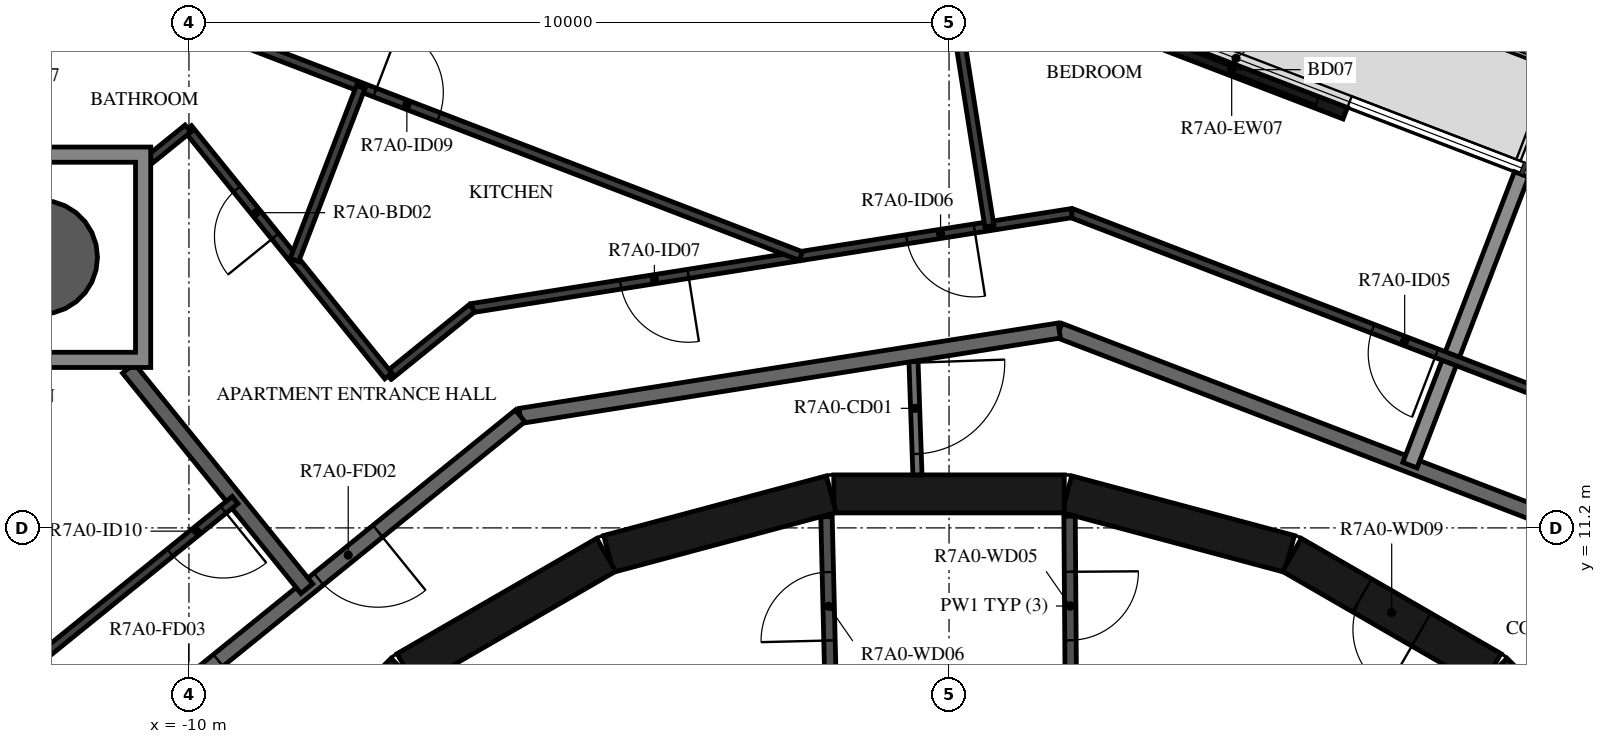
"""IFC4 building model, lengths in metres.
Left out: names, types, materials, properties, quantities, classifications, styles, units other than length and angle.
Written with IfcOpenShell. Run it as: python <this file> out.ifc"""

import sys

from ifc_helpers import new_model, si_unit, direction, frame, frame_2d, origin, origin_2d, place, context, subcontext, project, spatial, polyline, rectangle, hollow_circle, outline, extrude, element, fill, save


model = new_model("IFC4")
c1 = context("Model", 3, precision=1e-05, world=origin(), true_north=direction((0.0, 1.0)))
c2 = subcontext(c1, "Body", "Model", "MODEL_VIEW")
j1 = project(units=[si_unit("LENGTHUNIT", "METRE"), si_unit("PLANEANGLEUNIT", "RADIAN")], contexts=[c1])
p1 = place(None, origin())
s1 = spatial("IfcSite", under=j1, at=p1, CompositionType="ELEMENT")
p2 = place(p1, origin())
s2 = spatial("IfcBuilding", under=s1, at=p2, CompositionType="ELEMENT")
p3 = place(p2, frame((0.0, 0.0, 270.4)))
s3 = spatial("IfcBuildingStorey", under=s2, at=p3, CompositionType="ELEMENT", Elevation=270.4)
p4 = place(p3, frame((-11.953, 14.76, -0.38), z_axis=(0.0, 0.0, 1.0), x_axis=(1.0, 0.0, 0.0)))
e1 = element("IfcColumn", 1, at=p4, inside=s3, PredefinedType="COLUMN", context=c2, shape_type="SweptSolid", body=[
    extrude(hollow_circle(Radius=0.75, WallThickness=0.035, at=origin_2d()), origin(), (0.0, 0.0, 1.0), 3.5),
])
p5 = place(p3, frame((5.212, 16.655, 0.0), z_axis=(0.0, 0.0, 1.0), x_axis=(-0.933579413923, 0.358370587381, 0.0)))
e2 = element("IfcWall", 2, at=p5, inside=s3, PredefinedType="STANDARD", context=c2, shape_type="SweptSolid", body=[
    extrude(rectangle(XDim=3.2, YDim=0.16, at=frame_2d((1.6, 0.0))), origin(), (0.0, 0.0, 1.0), 3.12),
])
p6 = place(p5, frame((0.4, 0.0, 0.0)))
e3 = element("IfcOpeningElement", 3, at=p6, cuts=e2, PredefinedType="OPENING", context=c2, shape_type="SweptSolid", body=[
    extrude(rectangle(XDim=2.4, YDim=2.4, at=frame_2d((1.2, 1.2))), frame((0.0, 0.09, 0.0), z_axis=(0.0, -1.0, 0.0), x_axis=(1.0, 0.0, 0.0)), (0.0, 0.0, 1.0), 0.18),
])
p7 = place(p3, frame((9.308, 7.164, 0.0), z_axis=(0.0, 0.0, 1.0), x_axis=(-0.707106781187, 0.707106781187, 0.0)))
e4 = element("IfcWall", 4, at=p7, inside=s3, PredefinedType="SHEAR", context=c2, shape_type="SweptSolid", body=[
    extrude(rectangle(XDim=3.032, YDim=0.5, at=frame_2d((1.516, 0.0))), origin(), (0.0, 0.0, 1.0), 3.12),
])
p8 = place(p7, frame((0.416, 0.0, 0.0)))
e5 = element("IfcOpeningElement", 5, at=p8, cuts=e4, PredefinedType="OPENING", context=c2, shape_type="SweptSolid", body=[
    extrude(rectangle(XDim=1.2, YDim=2.1, at=frame_2d((0.6, 1.05))), frame((0.0, 0.26, 0.0), z_axis=(0.0, -1.0, 0.0), x_axis=(1.0, 0.0, 0.0)), (0.0, 0.0, 1.0), 0.52),
])
p9 = place(p3, frame((7.137, 9.329, 0.0), z_axis=(0.0, 0.0, 1.0), x_axis=(-0.865975092491, 0.500087131594, 0.0)))
e6 = element("IfcWall", 6, at=p9, inside=s3, PredefinedType="SHEAR", context=c2, shape_type="SweptSolid", body=[
    extrude(rectangle(XDim=3.033, YDim=0.5, at=frame_2d((1.516, 0.0))), origin(), (0.0, 0.0, 1.0), 3.12),
])
p10 = place(p9, frame((1.066, 0.0, 0.0)))
e7 = element("IfcOpeningElement", 7, at=p10, cuts=e6, PredefinedType="OPENING", context=c2, shape_type="SweptSolid", body=[
    extrude(rectangle(XDim=0.9, YDim=2.1, at=frame_2d((0.45, 1.05))), frame((0.0, 0.26, 0.0), z_axis=(0.0, -1.0, 0.0), x_axis=(1.0, 0.0, 0.0)), (0.0, 0.0, 1.0), 0.52),
])
for number, where, z_axis, x_axis in (
    (8, (4.479, 10.858, 0.0), (0.0, 0.0, 1.0), (-0.966, 0.259, 0.0)),
    (9, (1.516, 11.647, 0.0), (0.0, 0.0, 1.0), (-1.0, 0.0, 0.0)),
    (10, (-1.55, 11.643, 0.0), (0.0, 0.0, 1.0), (-0.966, -0.259, 0.0)),
    (11, (-4.51, 10.845, 0.0), (0.0, 0.0, 1.0), (-0.866, -0.5, 0.0)),
):
    element("IfcWall", number, at=place(p3, frame(where, z_axis=z_axis, x_axis=x_axis)), inside=s3, PredefinedType="SHEAR", context=c2, shape_type="SweptSolid", body=[
        extrude(rectangle(XDim=3.033, YDim=0.5, at=frame_2d((1.516, 0.0))), origin(), (0.0, 0.0, 1.0), 3.12),
    ])
p11 = place(p3, frame((-7.164, 9.308, 0.0), z_axis=(0.0, 0.0, 1.0), x_axis=(-0.707106781187, -0.707106781187, 0.0)))
e12 = element("IfcWall", 12, at=p11, inside=s3, PredefinedType="SHEAR", context=c2, shape_type="SweptSolid", body=[
    extrude(rectangle(XDim=3.032, YDim=0.5, at=frame_2d((1.516, 0.0))), origin(), (0.0, 0.0, 1.0), 3.12),
])
p12 = place(p11, frame((1.416, 0.0, 0.0)))
e13 = element("IfcOpeningElement", 13, at=p12, cuts=e12, PredefinedType="OPENING", context=c2, shape_type="SweptSolid", body=[
    extrude(rectangle(XDim=1.2, YDim=2.1, at=frame_2d((0.6, 1.05))), frame((0.0, 0.26, 0.0), z_axis=(0.0, -1.0, 0.0), x_axis=(1.0, 0.0, 0.0)), (0.0, 0.0, 1.0), 0.52),
])
p13 = place(p3, frame((1.586, 11.354, 0.0), z_axis=(0.0, 0.0, 1.0), x_axis=(0.007227482881, -0.999973881405, 0.0)))
e14 = element("IfcWall", 14, at=p13, inside=s3, PredefinedType="PARTITIONING", context=c2, shape_type="SweptSolid", body=[
    extrude(rectangle(XDim=2.365, YDim=0.15, at=frame_2d((1.182, 0.0))), origin(), (0.0, 0.0, 1.0), 3.12),
])
p14 = place(p13, frame((0.732, 0.0, 0.0)))
e15 = element("IfcOpeningElement", 15, at=p14, cuts=e14, PredefinedType="OPENING", context=c2, shape_type="SweptSolid", body=[
    extrude(rectangle(XDim=0.9, YDim=2.1, at=frame_2d((0.45, 1.05))), frame((0.0, 0.085, 0.0), z_axis=(0.0, -1.0, 0.0), x_axis=(1.0, 0.0, 0.0)), (0.0, 0.0, 1.0), 0.17),
])
p15 = place(p3, frame((-1.555, 8.99, 0.0), z_axis=(0.0, 0.0, 1.0), x_axis=(-0.024125549686, 0.999708936567, 0.0)))
e16 = element("IfcWall", 16, at=p15, inside=s3, PredefinedType="PARTITIONING", context=c2, shape_type="SweptSolid", body=[
    extrude(rectangle(XDim=2.358, YDim=0.15, at=frame_2d((1.179, 0.0))), origin(), (0.0, 0.0, 1.0), 3.12),
])
p16 = place(p15, frame((0.729, 0.0, 0.0)))
e17 = element("IfcOpeningElement", 17, at=p16, cuts=e16, PredefinedType="OPENING", context=c2, shape_type="SweptSolid", body=[
    extrude(rectangle(XDim=0.9, YDim=2.1, at=frame_2d((0.45, 1.05))), frame((0.0, 0.085, 0.0), z_axis=(0.0, -1.0, 0.0), x_axis=(1.0, 0.0, 0.0)), (0.0, 0.0, 1.0), 0.17),
])
p17 = place(p3, frame((-0.471, 13.492, 0.0), z_axis=(0.0, 0.0, 1.0), x_axis=(0.034873173869, -0.999391745886, 0.0)))
e18 = element("IfcWall", 18, at=p17, inside=s3, PredefinedType="PARTITIONING", context=c2, shape_type="SweptSolid", body=[
    extrude(rectangle(XDim=1.596, YDim=0.12, at=frame_2d((0.798, 0.0))), origin(), (0.0, 0.0, 1.0), 3.12),
])
p18 = place(p17, frame((0.12, 0.0, 0.0)))
e19 = element("IfcOpeningElement", 19, at=p18, cuts=e18, PredefinedType="OPENING", context=c2, shape_type="SweptSolid", body=[
    extrude(rectangle(XDim=1.2, YDim=2.1, at=frame_2d((0.6, 1.05))), frame((0.0, 0.07, 0.0), z_axis=(0.0, -1.0, 0.0), x_axis=(1.0, 0.0, 0.0)), (0.0, 0.0, 1.0), 0.14),
])
p19 = place(p3, frame((8.154, 11.223, 0.0), z_axis=(0.0, 0.0, 1.0), x_axis=(-0.93359073609, 0.358341090983, 0.0)))
e20 = element("IfcWall", 20, at=p19, inside=s3, PredefinedType="STANDARD", context=c2, shape_type="SweptSolid", body=[
    extrude(rectangle(XDim=7.181, YDim=0.2, at=frame_2d((3.59, 0.0))), origin(), (0.0, 0.0, 1.0), 3.12),
])
p20 = place(p3, frame((1.45, 13.797, 0.0), z_axis=(0.0, 0.0, 1.0), x_axis=(-0.987690361611, -0.156421704315, 0.0)))
e21 = element("IfcWall", 21, at=p20, inside=s3, PredefinedType="STANDARD", context=c2, shape_type="SweptSolid", body=[
    extrude(rectangle(XDim=7.181, YDim=0.2, at=frame_2d((3.591, 0.0))), origin(), (0.0, 0.0, 1.0), 3.12),
])
p21 = place(p3, frame((-5.643, 12.673, 0.0), z_axis=(0.0, 0.0, 1.0), x_axis=(-0.777160148113, -0.629302871585, 0.0)))
e22 = element("IfcWall", 22, at=p21, inside=s3, PredefinedType="STANDARD", context=c2, shape_type="SweptSolid", body=[
    extrude(rectangle(XDim=7.181, YDim=0.2, at=frame_2d((3.59, 0.0))), origin(), (0.0, 0.0, 1.0), 3.12),
])
p22 = place(p21, frame((2.41, 0.0, 0.0)))
e23 = element("IfcOpeningElement", 23, at=p22, cuts=e22, PredefinedType="OPENING", context=c2, shape_type="SweptSolid", body=[
    extrude(rectangle(XDim=1.0, YDim=2.1, at=frame_2d((0.5, 1.05))), frame((0.0, 0.11, 0.0), z_axis=(0.0, -1.0, 0.0), x_axis=(1.0, 0.0, 0.0)), (0.0, 0.0, 1.0), 0.22),
])
p23 = place(p21, frame((5.112, 0.0, 0.0)))
e24 = element("IfcOpeningElement", 24, at=p23, cuts=e22, PredefinedType="OPENING", context=c2, shape_type="SweptSolid", body=[
    extrude(rectangle(XDim=1.0, YDim=2.1, at=frame_2d((0.5, 1.05))), frame((0.0, 0.11, 0.0), z_axis=(0.0, -1.0, 0.0), x_axis=(1.0, 0.0, 0.0)), (0.0, 0.0, 1.0), 0.22),
])
p24 = place(p3, frame((7.532, 15.85, 0.0), z_axis=(0.0, 0.0, 1.0), x_axis=(-0.358355996975, -0.933585014571, 0.0)))
e25 = element("IfcWall", 25, at=p24, inside=s3, PredefinedType="STANDARD", context=c2, shape_type="SweptSolid", body=[
    extrude(rectangle(XDim=4.096, YDim=0.2, at=frame_2d((2.048, 0.0))), origin(), (0.0, 0.0, 1.0), 2.73),
])
p25 = place(p3, frame((-10.796, 13.299, 0.0), z_axis=(0.0, 0.0, 1.0), x_axis=(0.629290499381, -0.777170166301, 0.0)))
e26 = element("IfcWall", 26, at=p25, inside=s3, PredefinedType="STANDARD", context=c2, shape_type="SweptSolid", body=[
    extrude(rectangle(XDim=3.729, YDim=0.2, at=frame_2d((1.865, 0.0))), origin(), (0.0, 0.0, 1.0), 3.12),
])
p26 = place(p3, frame((9.067, 12.479, 0.0), z_axis=(0.0, 0.0, 1.0), x_axis=(-0.933579449035, 0.358370495911, 0.0)))
e27 = element("IfcWall", 27, at=p26, inside=s3, PredefinedType="PARTITIONING", context=c2, shape_type="SweptSolid", body=[
    extrude(rectangle(XDim=7.985, YDim=0.12, at=frame_2d((3.992, 0.0))), origin(), (0.0, 0.0, 1.0), 3.12),
])
p27 = place(p26, frame((2.841, 0.0, 0.0)))
e28 = element("IfcOpeningElement", 28, at=p27, cuts=e27, PredefinedType="OPENING", context=c2, shape_type="SweptSolid", body=[
    extrude(rectangle(XDim=0.9, YDim=2.1, at=frame_2d((0.45, 1.05))), frame((0.0, 0.07, 0.0), z_axis=(0.0, -1.0, 0.0), x_axis=(1.0, 0.0, 0.0)), (0.0, 0.0, 1.0), 0.14),
])
p28 = place(p3, frame((1.612, 15.341, 0.0), z_axis=(0.0, 0.0, 1.0), x_axis=(-0.987689722749, -0.156425738216, 0.0)))
e29 = element("IfcWall", 29, at=p28, inside=s3, PredefinedType="PARTITIONING", context=c2, shape_type="SweptSolid", body=[
    extrude(rectangle(XDim=7.985, YDim=0.12, at=frame_2d((3.992, 0.0))), origin(), (0.0, 0.0, 1.0), 3.12),
])
p29 = place(p28, frame((1.295, 0.0, 0.0)))
e30 = element("IfcOpeningElement", 30, at=p29, cuts=e29, PredefinedType="OPENING", context=c2, shape_type="SweptSolid", body=[
    extrude(rectangle(XDim=0.9, YDim=2.1, at=frame_2d((0.45, 1.05))), frame((0.0, 0.07, 0.0), z_axis=(0.0, -1.0, 0.0), x_axis=(1.0, 0.0, 0.0)), (0.0, 0.0, 1.0), 0.14),
])
p30 = place(p28, frame((5.107, 0.0, 0.0)))
e31 = element("IfcOpeningElement", 31, at=p30, cuts=e29, PredefinedType="OPENING", context=c2, shape_type="SweptSolid", body=[
    extrude(rectangle(XDim=0.9, YDim=2.1, at=frame_2d((0.45, 1.05))), frame((0.0, 0.07, 0.0), z_axis=(0.0, -1.0, 0.0), x_axis=(1.0, 0.0, 0.0)), (0.0, 0.0, 1.0), 0.14),
])
p31 = place(p3, frame((-6.274, 14.092, 0.0), z_axis=(0.0, 0.0, 1.0), x_axis=(-0.777144673245, -0.629321981855, 0.0)))
e32 = element("IfcWall", 32, at=p31, inside=s3, PredefinedType="PARTITIONING", context=c2, shape_type="SweptSolid", body=[
    extrude(rectangle(XDim=1.419, YDim=0.12, at=frame_2d((0.709, 0.0))), origin(), (0.0, 0.0, 1.0), 3.12),
])
p32 = place(p3, frame((-7.377, 13.199, 0.0), z_axis=(0.0, 0.0, 1.0), x_axis=(-0.629382670352, 0.77709552454, 0.0)))
e33 = element("IfcWall", 33, at=p32, inside=s3, PredefinedType="PARTITIONING", context=c2, shape_type="SweptSolid", body=[
    extrude(rectangle(XDim=4.188, YDim=0.12, at=frame_2d((2.094, 0.0))), origin(), (0.0, 0.0, 1.0), 3.12),
])
p33 = place(p32, frame((2.364, 0.0, 0.0)))
e34 = element("IfcOpeningElement", 34, at=p33, cuts=e33, PredefinedType="OPENING", context=c2, shape_type="SweptSolid", body=[
    extrude(rectangle(XDim=0.8, YDim=2.1, at=frame_2d((0.4, 1.05))), frame((0.0, 0.07, 0.0), z_axis=(0.0, -1.0, 0.0), x_axis=(1.0, 0.0, 0.0)), (0.0, 0.0, 1.0), 0.14),
])
p34 = place(p3, frame((-10.013, 16.454, 0.0), z_axis=(0.0, 0.0, 1.0), x_axis=(-0.777001388062, -0.629498882406, 0.0)))
e35 = element("IfcWall", 35, at=p34, inside=s3, PredefinedType="PARTITIONING", context=c2, shape_type="SweptSolid", body=[
    extrude(rectangle(XDim=0.631, YDim=0.12, at=frame_2d((0.315, 0.0))), origin(), (0.0, 0.0, 1.0), 3.12),
])
p35 = place(p3, frame((-0.037, 18.756, 0.0), z_axis=(0.0, 0.0, 1.0), x_axis=(0.156421851095, -0.987690338365, 0.0)))
e36 = element("IfcWall", 36, at=p35, inside=s3, PredefinedType="PARTITIONING", context=c2, shape_type="SweptSolid", body=[
    extrude(rectangle(XDim=3.63, YDim=0.12, at=frame_2d((1.815, 0.0))), origin(), (0.0, 0.0, 1.0), 3.12),
])
p36 = place(p3, frame((-10.289, 17.978, 0.0), z_axis=(0.0, 0.0, 1.0), x_axis=(0.933579293595, -0.358370900844, 0.0)))
e37 = element("IfcWall", 37, at=p36, inside=s3, PredefinedType="PARTITIONING", context=c2, shape_type="SweptSolid", body=[
    extrude(rectangle(XDim=8.932, YDim=0.12, at=frame_2d((4.466, 0.0))), origin(), (0.0, 0.0, 1.0), 3.12),
])
p37 = place(p36, frame((2.93, 0.0, 0.0)))
e38 = element("IfcOpeningElement", 38, at=p37, cuts=e37, PredefinedType="OPENING", context=c2, shape_type="SweptSolid", body=[
    extrude(rectangle(XDim=0.9, YDim=2.1, at=frame_2d((0.45, 1.05))), frame((0.0, 0.07, 0.0), z_axis=(0.0, -1.0, 0.0), x_axis=(1.0, 0.0, 0.0)), (0.0, 0.0, 1.0), 0.14),
])
p38 = place(p3, frame((-7.74, 17.0, 0.0), z_axis=(0.0, 0.0, 1.0), x_axis=(-0.358394723652, -0.93357014844, 0.0)))
e39 = element("IfcWall", 39, at=p38, inside=s3, PredefinedType="PARTITIONING", context=c2, shape_type="SweptSolid", body=[
    extrude(rectangle(XDim=2.436, YDim=0.12, at=frame_2d((1.218, 0.0))), origin(), (0.0, 0.0, 1.0), 3.12),
])
p39 = place(p3, frame((-9.393, 11.566, 0.0), z_axis=(0.0, 0.0, 1.0), x_axis=(-0.777100258587, -0.629376825205, 0.0)))
e40 = element("IfcWall", 40, at=p39, inside=s3, PredefinedType="PARTITIONING", context=c2, shape_type="SweptSolid", body=[
    extrude(rectangle(XDim=3.971, YDim=0.12, at=frame_2d((1.986, 0.0))), origin(), (0.0, 0.0, 1.0), 3.12),
])
p40 = place(p39, frame((0.2, 0.0, 0.0)))
e41 = element("IfcOpeningElement", 41, at=p40, cuts=e40, PredefinedType="OPENING", context=c2, shape_type="SweptSolid", body=[
    extrude(rectangle(XDim=0.9, YDim=2.1, at=frame_2d((0.45, 1.05))), frame((0.0, 0.07, 0.0), z_axis=(0.0, -1.0, 0.0), x_axis=(1.0, 0.0, 0.0)), (0.0, 0.0, 1.0), 0.14),
])
p41 = place(p3, origin())
e42 = element("IfcWall", 42, at=p41, inside=s3, PredefinedType="STANDARD", context=c2, shape_type="SweptSolid", body=[
    extrude(outline(polyline([(-10.503, 16.21), (-10.503, 13.311), (-13.403, 13.311), (-13.403, 16.21), (-10.503, 16.21)]), holes=[polyline([(-13.203, 13.51), (-10.703, 13.51), (-10.703, 16.01), (-13.203, 16.01), (-13.203, 13.51)])]), origin(), (0.0, 0.0, 1.0), 3.12),
])
p42 = place(p6, origin())
e43 = element("IfcDoor", 43, at=p42, inside=s3, OperationType="DOUBLE_DOOR_SLIDING", PredefinedType="DOOR", context=c2, shape_type="SweptSolid", body=[
    extrude(rectangle(XDim=2.4, YDim=2.4, at=frame_2d((1.2, 1.2))), frame((0.0, 0.025, 0.0), z_axis=(0.0, -1.0, 0.0), x_axis=(1.0, 0.0, 0.0)), (0.0, 0.0, 1.0), 0.05),
])
fill(e3, e43)
p43 = place(p14, origin())
e44 = element("IfcDoor", 44, at=p43, inside=s3, OperationType="SINGLE_SWING_LEFT", PredefinedType="DOOR", context=c2, shape_type="SweptSolid", body=[
    extrude(rectangle(XDim=0.9, YDim=2.1, at=frame_2d((0.45, 1.05))), frame((0.0, 0.025, 0.0), z_axis=(0.0, -1.0, 0.0), x_axis=(1.0, 0.0, 0.0)), (0.0, 0.0, 1.0), 0.05),
])
fill(e15, e44)
p44 = place(p16, origin())
e45 = element("IfcDoor", 45, at=p44, inside=s3, OperationType="SINGLE_SWING_RIGHT", PredefinedType="DOOR", context=c2, shape_type="SweptSolid", body=[
    extrude(rectangle(XDim=0.9, YDim=2.1, at=frame_2d((0.45, 1.05))), frame((0.0, 0.025, 0.0), z_axis=(0.0, -1.0, 0.0), x_axis=(1.0, 0.0, 0.0)), (0.0, 0.0, 1.0), 0.05),
])
fill(e17, e45)
p45 = place(p10, origin())
e46 = element("IfcDoor", 46, at=p45, inside=s3, OperationType="SINGLE_SWING_LEFT", PredefinedType="DOOR", context=c2, shape_type="SweptSolid", body=[
    extrude(rectangle(XDim=0.9, YDim=2.1, at=frame_2d((0.45, 1.05))), frame((0.0, 0.025, 0.0), z_axis=(0.0, -1.0, 0.0), x_axis=(1.0, 0.0, 0.0)), (0.0, 0.0, 1.0), 0.05),
])
fill(e7, e46)
p46 = place(p22, origin())
e47 = element("IfcDoor", 47, at=p46, inside=s3, OperationType="SINGLE_SWING_RIGHT", PredefinedType="DOOR", context=c2, shape_type="SweptSolid", body=[
    extrude(rectangle(XDim=1.0, YDim=2.1, at=frame_2d((0.5, 1.05))), frame((0.0, 0.025, 0.0), z_axis=(0.0, -1.0, 0.0), x_axis=(1.0, 0.0, 0.0)), (0.0, 0.0, 1.0), 0.05),
])
fill(e23, e47)
p47 = place(p27, origin())
e48 = element("IfcDoor", 48, at=p47, inside=s3, OperationType="SINGLE_SWING_LEFT", PredefinedType="DOOR", context=c2, shape_type="SweptSolid", body=[
    extrude(rectangle(XDim=0.9, YDim=2.1, at=frame_2d((0.45, 1.05))), frame((0.0, 0.025, 0.0), z_axis=(0.0, -1.0, 0.0), x_axis=(1.0, 0.0, 0.0)), (0.0, 0.0, 1.0), 0.05),
])
fill(e28, e48)
p48 = place(p29, origin())
e49 = element("IfcDoor", 49, at=p48, inside=s3, OperationType="SINGLE_SWING_RIGHT", PredefinedType="DOOR", context=c2, shape_type="SweptSolid", body=[
    extrude(rectangle(XDim=0.9, YDim=2.1, at=frame_2d((0.45, 1.05))), frame((0.0, 0.025, 0.0), z_axis=(0.0, -1.0, 0.0), x_axis=(1.0, 0.0, 0.0)), (0.0, 0.0, 1.0), 0.05),
])
fill(e30, e49)
p49 = place(p30, origin())
e50 = element("IfcDoor", 50, at=p49, inside=s3, OperationType="SINGLE_SWING_RIGHT", PredefinedType="DOOR", context=c2, shape_type="SweptSolid", body=[
    extrude(rectangle(XDim=0.9, YDim=2.1, at=frame_2d((0.45, 1.05))), frame((0.0, 0.025, 0.0), z_axis=(0.0, -1.0, 0.0), x_axis=(1.0, 0.0, 0.0)), (0.0, 0.0, 1.0), 0.05),
])
fill(e31, e50)
p50 = place(p33, origin())
e51 = element("IfcDoor", 51, at=p50, inside=s3, OperationType="SINGLE_SWING_RIGHT", PredefinedType="DOOR", context=c2, shape_type="SweptSolid", body=[
    extrude(rectangle(XDim=0.8, YDim=2.1, at=frame_2d((0.4, 1.05))), frame((0.0, 0.025, 0.0), z_axis=(0.0, -1.0, 0.0), x_axis=(1.0, 0.0, 0.0)), (0.0, 0.0, 1.0), 0.05),
])
fill(e34, e51)
p51 = place(p37, origin())
e52 = element("IfcDoor", 52, at=p51, inside=s3, OperationType="SINGLE_SWING_LEFT", PredefinedType="DOOR", context=c2, shape_type="SweptSolid", body=[
    extrude(rectangle(XDim=0.9, YDim=2.1, at=frame_2d((0.45, 1.05))), frame((0.0, 0.025, 0.0), z_axis=(0.0, -1.0, 0.0), x_axis=(1.0, 0.0, 0.0)), (0.0, 0.0, 1.0), 0.05),
])
fill(e38, e52)
p52 = place(p23, origin())
e53 = element("IfcDoor", 53, at=p52, inside=s3, OperationType="SINGLE_SWING_LEFT", PredefinedType="DOOR", context=c2, shape_type="SweptSolid", body=[
    extrude(rectangle(XDim=1.0, YDim=2.1, at=frame_2d((0.5, 1.05))), frame((0.0, 0.025, 0.0), z_axis=(0.0, -1.0, 0.0), x_axis=(1.0, 0.0, 0.0)), (0.0, 0.0, 1.0), 0.05),
])
fill(e24, e53)
p53 = place(p40, origin())
e54 = element("IfcDoor", 54, at=p53, inside=s3, OperationType="SINGLE_SWING_LEFT", PredefinedType="DOOR", context=c2, shape_type="SweptSolid", body=[
    extrude(rectangle(XDim=0.9, YDim=2.1, at=frame_2d((0.45, 1.05))), frame((0.0, 0.025, 0.0), z_axis=(0.0, -1.0, 0.0), x_axis=(1.0, 0.0, 0.0)), (0.0, 0.0, 1.0), 0.05),
])
fill(e41, e54)
p54 = place(p18, origin())
e55 = element("IfcDoor", 55, at=p54, inside=s3, OperationType="DOUBLE_DOOR_SINGLE_SWING", PredefinedType="DOOR", context=c2, shape_type="SweptSolid", body=[
    extrude(rectangle(XDim=1.2, YDim=2.1, at=frame_2d((0.6, 1.05))), frame((0.0, 0.025, 0.0), z_axis=(0.0, -1.0, 0.0), x_axis=(1.0, 0.0, 0.0)), (0.0, 0.0, 1.0), 0.05),
])
fill(e19, e55)
save(model, sys.argv[1])
